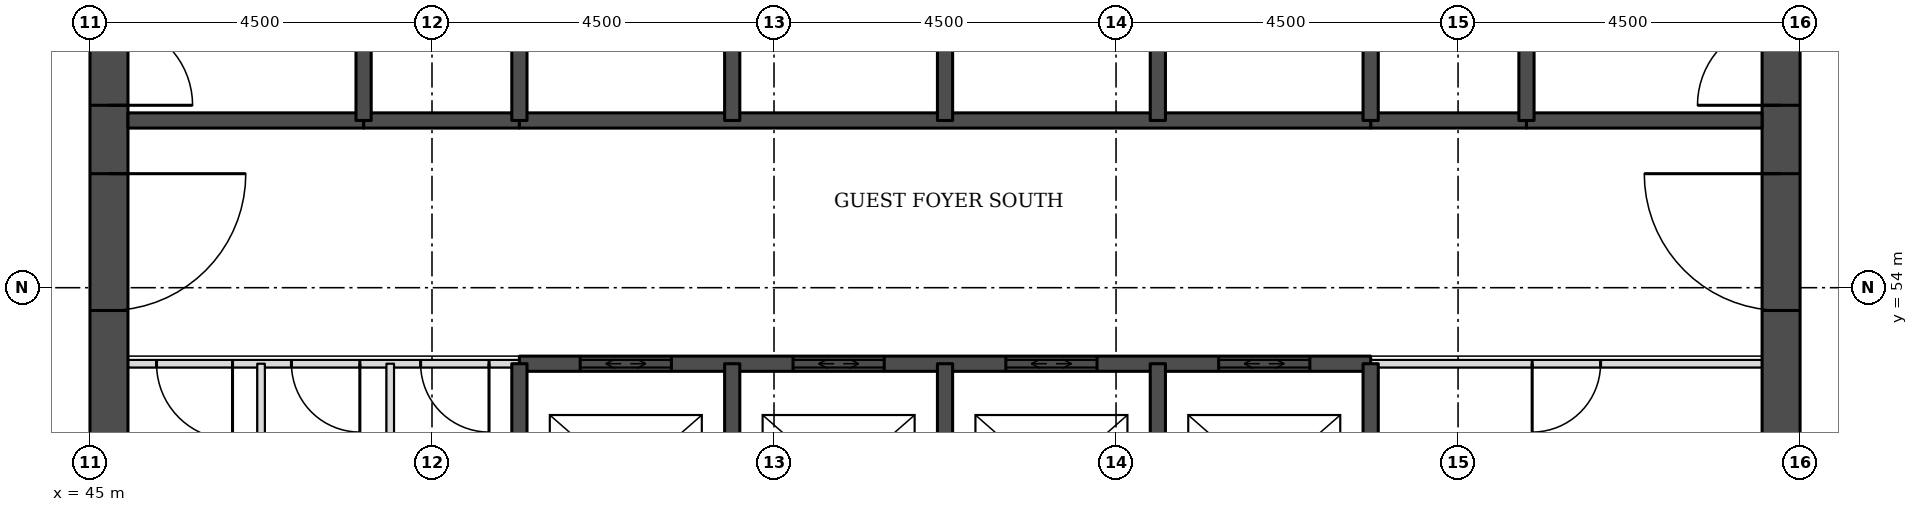
"""IFC4 building model, lengths in metres.
Left out: names, types, materials, properties, quantities, classifications, styles, units other than length and angle.
Written with IfcOpenShell. Run it as: python <this file> out.ifc"""

import sys

from ifc_helpers import new_model, si_unit, direction, frame, frame_2d, origin, place, context, subcontext, project, spatial, rectangle, extrude, element, fill, save


model = new_model("IFC4")
c1 = context("Model", 3, precision=1e-05, world=origin(), true_north=direction((0.0, 1.0)))
c2 = subcontext(c1, "Body", "Model", "MODEL_VIEW")
j1 = project(units=[si_unit("LENGTHUNIT", "METRE"), si_unit("PLANEANGLEUNIT", "RADIAN")], contexts=[c1])
p1 = place(None, origin())
s1 = spatial("IfcSite", under=j1, at=p1, CompositionType="ELEMENT")
p2 = place(p1, origin())
s2 = spatial("IfcBuilding", under=s1, at=p2, CompositionType="ELEMENT")
p3 = place(p2, frame((0.0, 0.0, 33.0)))
s3 = spatial("IfcBuildingStorey", under=s2, at=p3, CompositionType="ELEMENT", Elevation=33.0)
p4 = place(p3, frame((45.25, 49.5, 0.0), z_axis=(0.0, 0.0, 1.0), x_axis=(0.0, 1.0, 0.0)))
e1 = element("IfcWall", 1, at=p4, inside=s3, PredefinedType="SHEAR", context=c2, shape_type="SweptSolid", body=[
    extrude(rectangle(XDim=22.5, YDim=0.5, at=frame_2d((11.25, 0.0))), origin(), (0.0, 0.0, 1.0), 3.3),
])
p5 = place(p4, frame((4.2, 0.0, 0.0)))
e2 = element("IfcOpeningElement", 2, at=p5, cuts=e1, PredefinedType="OPENING", context=c2, shape_type="SweptSolid", body=[
    extrude(rectangle(XDim=1.8, YDim=2.1, at=frame_2d((0.9, 1.05))), frame((0.0, 0.26, 0.0), z_axis=(0.0, -1.0, 0.0), x_axis=(1.0, 0.0, 0.0)), (0.0, 0.0, 1.0), 0.52),
])
p6 = place(p4, frame((6.9, 0.0, 0.0)))
e3 = element("IfcOpeningElement", 3, at=p6, cuts=e1, PredefinedType="OPENING", context=c2, shape_type="SweptSolid", body=[
    extrude(rectangle(XDim=1.1, YDim=2.1, at=frame_2d((0.55, 1.05))), frame((0.0, 0.26, 0.0), z_axis=(0.0, -1.0, 0.0), x_axis=(1.0, 0.0, 0.0)), (0.0, 0.0, 1.0), 0.52),
])
p7 = place(p4, frame((13.6, 0.0, 0.0)))
e4 = element("IfcOpeningElement", 4, at=p7, cuts=e1, PredefinedType="OPENING", context=c2, shape_type="SweptSolid", body=[
    extrude(rectangle(XDim=1.1, YDim=2.1, at=frame_2d((0.55, 1.05))), frame((0.0, 0.26, 0.0), z_axis=(0.0, -1.0, 0.0), x_axis=(1.0, 0.0, 0.0)), (0.0, 0.0, 1.0), 0.52),
])
p8 = place(p4, frame((16.5, 0.0, 0.0)))
e5 = element("IfcOpeningElement", 5, at=p8, cuts=e1, PredefinedType="OPENING", context=c2, shape_type="SweptSolid", body=[
    extrude(rectangle(XDim=1.8, YDim=2.1, at=frame_2d((0.9, 1.05))), frame((0.0, 0.26, 0.0), z_axis=(0.0, -1.0, 0.0), x_axis=(1.0, 0.0, 0.0)), (0.0, 0.0, 1.0), 0.52),
])
p9 = place(p3, frame((67.25, 49.5, 0.0), z_axis=(0.0, 0.0, 1.0), x_axis=(0.0, 1.0, 0.0)))
e6 = element("IfcWall", 6, at=p9, inside=s3, PredefinedType="SHEAR", context=c2, shape_type="SweptSolid", body=[
    extrude(rectangle(XDim=22.5, YDim=0.5, at=frame_2d((11.25, 0.0))), origin(), (0.0, 0.0, 1.0), 3.3),
])
p10 = place(p9, frame((4.2, 0.0, 0.0)))
e7 = element("IfcOpeningElement", 7, at=p10, cuts=e6, PredefinedType="OPENING", context=c2, shape_type="SweptSolid", body=[
    extrude(rectangle(XDim=1.8, YDim=2.1, at=frame_2d((0.9, 1.05))), frame((0.0, 0.26, 0.0), z_axis=(0.0, -1.0, 0.0), x_axis=(1.0, 0.0, 0.0)), (0.0, 0.0, 1.0), 0.52),
])
p11 = place(p9, frame((6.9, 0.0, 0.0)))
e8 = element("IfcOpeningElement", 8, at=p11, cuts=e6, PredefinedType="OPENING", context=c2, shape_type="SweptSolid", body=[
    extrude(rectangle(XDim=1.1, YDim=2.1, at=frame_2d((0.55, 1.05))), frame((0.0, 0.26, 0.0), z_axis=(0.0, -1.0, 0.0), x_axis=(1.0, 0.0, 0.0)), (0.0, 0.0, 1.0), 0.52),
])
p12 = place(p9, frame((13.6, 0.0, 0.0)))
e9 = element("IfcOpeningElement", 9, at=p12, cuts=e6, PredefinedType="OPENING", context=c2, shape_type="SweptSolid", body=[
    extrude(rectangle(XDim=1.1, YDim=2.1, at=frame_2d((0.55, 1.05))), frame((0.0, 0.26, 0.0), z_axis=(0.0, -1.0, 0.0), x_axis=(1.0, 0.0, 0.0)), (0.0, 0.0, 1.0), 0.52),
])
p13 = place(p9, frame((16.5, 0.0, 0.0)))
e10 = element("IfcOpeningElement", 10, at=p13, cuts=e6, PredefinedType="OPENING", context=c2, shape_type="SweptSolid", body=[
    extrude(rectangle(XDim=1.8, YDim=2.1, at=frame_2d((0.9, 1.05))), frame((0.0, 0.26, 0.0), z_axis=(0.0, -1.0, 0.0), x_axis=(1.0, 0.0, 0.0)), (0.0, 0.0, 1.0), 0.52),
])
p14 = place(p3, frame((45.5, 53.0, 0.0), z_axis=(0.0, 0.0, 1.0), x_axis=(1.0, 0.0, 0.0)))
e11 = element("IfcWall", 11, at=p14, inside=s3, PredefinedType="PARTITIONING", context=c2, shape_type="SweptSolid", body=[
    extrude(rectangle(XDim=5.15, YDim=0.1, at=frame_2d((2.575, 0.0))), origin(), (0.0, 0.0, 1.0), 3.08),
])
p15 = place(p14, frame((0.375, 0.0, 0.0)))
e12 = element("IfcOpeningElement", 12, at=p15, cuts=e11, PredefinedType="OPENING", context=c2, shape_type="SweptSolid", body=[
    extrude(rectangle(XDim=1.0, YDim=2.1, at=frame_2d((0.5, 1.05))), frame((0.0, 0.06, 0.0), z_axis=(0.0, -1.0, 0.0), x_axis=(1.0, 0.0, 0.0)), (0.0, 0.0, 1.0), 0.12),
])
p16 = place(p14, frame((2.151, 0.0, 0.0)))
e13 = element("IfcOpeningElement", 13, at=p16, cuts=e11, PredefinedType="OPENING", context=c2, shape_type="SweptSolid", body=[
    extrude(rectangle(XDim=0.9, YDim=2.1, at=frame_2d((0.45, 1.05))), frame((0.0, 0.06, 0.0), z_axis=(0.0, -1.0, 0.0), x_axis=(1.0, 0.0, 0.0)), (0.0, 0.0, 1.0), 0.12),
])
p17 = place(p14, frame((3.85, 0.0, 0.0)))
e14 = element("IfcOpeningElement", 14, at=p17, cuts=e11, PredefinedType="OPENING", context=c2, shape_type="SweptSolid", body=[
    extrude(rectangle(XDim=0.9, YDim=2.1, at=frame_2d((0.45, 1.05))), frame((0.0, 0.06, 0.0), z_axis=(0.0, -1.0, 0.0), x_axis=(1.0, 0.0, 0.0)), (0.0, 0.0, 1.0), 0.12),
])
p18 = place(p3, frame((61.85, 53.0, 0.0), z_axis=(0.0, 0.0, 1.0), x_axis=(1.0, 0.0, 0.0)))
e15 = element("IfcWall", 15, at=p18, inside=s3, PredefinedType="PARTITIONING", context=c2, shape_type="SweptSolid", body=[
    extrude(rectangle(XDim=5.15, YDim=0.1, at=frame_2d((2.575, 0.0))), origin(), (0.0, 0.0, 1.0), 3.08),
])
p19 = place(p18, frame((2.125, 0.0, 0.0)))
e16 = element("IfcOpeningElement", 16, at=p19, cuts=e15, PredefinedType="OPENING", context=c2, shape_type="SweptSolid", body=[
    extrude(rectangle(XDim=0.9, YDim=2.1, at=frame_2d((0.45, 1.05))), frame((0.0, 0.06, 0.0), z_axis=(0.0, -1.0, 0.0), x_axis=(1.0, 0.0, 0.0)), (0.0, 0.0, 1.0), 0.12),
])
p20 = place(p3, frame((50.65, 53.0, 0.0), z_axis=(0.0, 0.0, 1.0), x_axis=(1.0, 0.0, 0.0)))
e17 = element("IfcWall", 17, at=p20, inside=s3, PredefinedType="SOLIDWALL", context=c2, shape_type="SweptSolid", body=[
    extrude(rectangle(XDim=11.2, YDim=0.2, at=frame_2d((5.6, 0.0))), origin(), (0.0, 0.0, 1.0), 3.08),
])
p21 = place(p20, frame((0.8, 0.0, 0.0)))
e18 = element("IfcOpeningElement", 18, at=p21, cuts=e17, PredefinedType="OPENING", context=c2, shape_type="SweptSolid", body=[
    extrude(rectangle(XDim=1.2, YDim=2.1, at=frame_2d((0.6, 1.05))), frame((0.0, 0.11, 0.0), z_axis=(0.0, -1.0, 0.0), x_axis=(1.0, 0.0, 0.0)), (0.0, 0.0, 1.0), 0.22),
])
p22 = place(p20, frame((3.6, 0.0, 0.0)))
e19 = element("IfcOpeningElement", 19, at=p22, cuts=e17, PredefinedType="OPENING", context=c2, shape_type="SweptSolid", body=[
    extrude(rectangle(XDim=1.2, YDim=2.1, at=frame_2d((0.6, 1.05))), frame((0.0, 0.11, 0.0), z_axis=(0.0, -1.0, 0.0), x_axis=(1.0, 0.0, 0.0)), (0.0, 0.0, 1.0), 0.22),
])
p23 = place(p20, frame((6.4, 0.0, 0.0)))
e20 = element("IfcOpeningElement", 20, at=p23, cuts=e17, PredefinedType="OPENING", context=c2, shape_type="SweptSolid", body=[
    extrude(rectangle(XDim=1.2, YDim=2.1, at=frame_2d((0.6, 1.05))), frame((0.0, 0.11, 0.0), z_axis=(0.0, -1.0, 0.0), x_axis=(1.0, 0.0, 0.0)), (0.0, 0.0, 1.0), 0.22),
])
p24 = place(p20, frame((9.2, 0.0, 0.0)))
e21 = element("IfcOpeningElement", 21, at=p24, cuts=e17, PredefinedType="OPENING", context=c2, shape_type="SweptSolid", body=[
    extrude(rectangle(XDim=1.2, YDim=2.1, at=frame_2d((0.6, 1.05))), frame((0.0, 0.11, 0.0), z_axis=(0.0, -1.0, 0.0), x_axis=(1.0, 0.0, 0.0)), (0.0, 0.0, 1.0), 0.22),
])
for number, where, z_axis, x_axis in (
    (22, (48.6, 56.2, 0.0), (0.0, 0.0, 1.0), (1.0, 0.0, 0.0)),
    (23, (61.85, 56.2, 0.0), (0.0, 0.0, 1.0), (1.0, 0.0, 0.0)),
):
    element("IfcWall", number, at=place(p3, frame(where, z_axis=z_axis, x_axis=x_axis)), inside=s3, PredefinedType="SOLIDWALL", context=c2, shape_type="SweptSolid", body=[
        extrude(rectangle(XDim=2.05, YDim=0.2, at=frame_2d((1.025, 0.0))), origin(), (0.0, 0.0, 1.0), 3.08),
    ])
p25 = place(p3, frame((45.5, 56.2, 0.0), z_axis=(0.0, 0.0, 1.0), x_axis=(1.0, 0.0, 0.0)))
e24 = element("IfcWall", 24, at=p25, inside=s3, PredefinedType="SOLIDWALL", context=c2, shape_type="SweptSolid", body=[
    extrude(rectangle(XDim=3.1, YDim=0.2, at=frame_2d((1.55, 0.0))), origin(), (0.0, 0.0, 1.0), 3.08),
])
p26 = place(p3, frame((50.65, 56.2, 0.0), z_axis=(0.0, 0.0, 1.0), x_axis=(1.0, 0.0, 0.0)))
e25 = element("IfcWall", 25, at=p26, inside=s3, PredefinedType="SOLIDWALL", context=c2, shape_type="SweptSolid", body=[
    extrude(rectangle(XDim=11.2, YDim=0.2, at=frame_2d((5.6, 0.0))), origin(), (0.0, 0.0, 1.0), 3.08),
])
p27 = place(p3, frame((63.9, 56.2, 0.0), z_axis=(0.0, 0.0, 1.0), x_axis=(1.0, 0.0, 0.0)))
e26 = element("IfcWall", 26, at=p27, inside=s3, PredefinedType="SOLIDWALL", context=c2, shape_type="SweptSolid", body=[
    extrude(rectangle(XDim=3.1, YDim=0.2, at=frame_2d((1.55, 0.0))), origin(), (0.0, 0.0, 1.0), 3.08),
])
p28 = place(p3, frame((47.251, 50.0, 0.0), z_axis=(0.0, 0.0, 1.0), x_axis=(0.0, 1.0, 0.0)))
e27 = element("IfcWall", 27, at=p28, inside=s3, PredefinedType="PARTITIONING", context=c2, shape_type="SweptSolid", body=[
    extrude(rectangle(XDim=3.0, YDim=0.1, at=frame_2d((1.5, 0.0))), origin(), (0.0, 0.0, 1.0), 3.08),
])
p29 = place(p3, frame((48.6, 56.2, 0.0), z_axis=(0.0, 0.0, 1.0), x_axis=(0.0, 1.0, 0.0)))
e28 = element("IfcWall", 28, at=p29, inside=s3, PredefinedType="SOLIDWALL", context=c2, shape_type="SweptSolid", body=[
    extrude(rectangle(XDim=5.8, YDim=0.2, at=frame_2d((2.9, 0.0))), origin(), (0.0, 0.0, 1.0), 3.08),
])
p30 = place(p3, frame((48.95, 50.0, 0.0), z_axis=(0.0, 0.0, 1.0), x_axis=(0.0, 1.0, 0.0)))
e29 = element("IfcWall", 29, at=p30, inside=s3, PredefinedType="PARTITIONING", context=c2, shape_type="SweptSolid", body=[
    extrude(rectangle(XDim=3.0, YDim=0.1, at=frame_2d((1.5, 0.0))), origin(), (0.0, 0.0, 1.0), 3.08),
])
p31 = place(p3, frame((50.65, 50.0, 0.0), z_axis=(0.0, 0.0, 1.0), x_axis=(0.0, 1.0, 0.0)))
e30 = element("IfcWall", 30, at=p31, inside=s3, PredefinedType="SOLIDWALL", context=c2, shape_type="SweptSolid", body=[
    extrude(rectangle(XDim=3.0, YDim=0.2, at=frame_2d((1.5, 0.0))), origin(), (0.0, 0.0, 1.0), 3.08),
])
p32 = place(p3, frame((50.65, 56.2, 0.0), z_axis=(0.0, 0.0, 1.0), x_axis=(0.0, 1.0, 0.0)))
e31 = element("IfcWall", 31, at=p32, inside=s3, PredefinedType="SOLIDWALL", context=c2, shape_type="SweptSolid", body=[
    extrude(rectangle(XDim=2.8, YDim=0.2, at=frame_2d((1.4, 0.0))), origin(), (0.0, 0.0, 1.0), 3.08),
])
p33 = place(p3, frame((53.45, 50.0, 0.0), z_axis=(0.0, 0.0, 1.0), x_axis=(0.0, 1.0, 0.0)))
e32 = element("IfcWall", 32, at=p33, inside=s3, PredefinedType="SOLIDWALL", context=c2, shape_type="SweptSolid", body=[
    extrude(rectangle(XDim=3.0, YDim=0.2, at=frame_2d((1.5, 0.0))), origin(), (0.0, 0.0, 1.0), 3.08),
])
p34 = place(p3, frame((53.45, 56.2, 0.0), z_axis=(0.0, 0.0, 1.0), x_axis=(0.0, 1.0, 0.0)))
e33 = element("IfcWall", 33, at=p34, inside=s3, PredefinedType="SOLIDWALL", context=c2, shape_type="SweptSolid", body=[
    extrude(rectangle(XDim=2.8, YDim=0.2, at=frame_2d((1.4, 0.0))), origin(), (0.0, 0.0, 1.0), 3.08),
])
p35 = place(p3, frame((56.25, 50.0, 0.0), z_axis=(0.0, 0.0, 1.0), x_axis=(0.0, 1.0, 0.0)))
e34 = element("IfcWall", 34, at=p35, inside=s3, PredefinedType="SOLIDWALL", context=c2, shape_type="SweptSolid", body=[
    extrude(rectangle(XDim=3.0, YDim=0.2, at=frame_2d((1.5, 0.0))), origin(), (0.0, 0.0, 1.0), 3.08),
])
p36 = place(p3, frame((56.25, 56.2, 0.0), z_axis=(0.0, 0.0, 1.0), x_axis=(0.0, 1.0, 0.0)))
e35 = element("IfcWall", 35, at=p36, inside=s3, PredefinedType="SOLIDWALL", context=c2, shape_type="SweptSolid", body=[
    extrude(rectangle(XDim=2.8, YDim=0.2, at=frame_2d((1.4, 0.0))), origin(), (0.0, 0.0, 1.0), 3.08),
])
p37 = place(p3, frame((59.05, 50.0, 0.0), z_axis=(0.0, 0.0, 1.0), x_axis=(0.0, 1.0, 0.0)))
e36 = element("IfcWall", 36, at=p37, inside=s3, PredefinedType="SOLIDWALL", context=c2, shape_type="SweptSolid", body=[
    extrude(rectangle(XDim=3.0, YDim=0.2, at=frame_2d((1.5, 0.0))), origin(), (0.0, 0.0, 1.0), 3.08),
])
p38 = place(p3, frame((59.05, 56.2, 0.0), z_axis=(0.0, 0.0, 1.0), x_axis=(0.0, 1.0, 0.0)))
e37 = element("IfcWall", 37, at=p38, inside=s3, PredefinedType="SOLIDWALL", context=c2, shape_type="SweptSolid", body=[
    extrude(rectangle(XDim=2.8, YDim=0.2, at=frame_2d((1.4, 0.0))), origin(), (0.0, 0.0, 1.0), 3.08),
])
p39 = place(p3, frame((61.85, 50.0, 0.0), z_axis=(0.0, 0.0, 1.0), x_axis=(0.0, 1.0, 0.0)))
e38 = element("IfcWall", 38, at=p39, inside=s3, PredefinedType="SOLIDWALL", context=c2, shape_type="SweptSolid", body=[
    extrude(rectangle(XDim=3.0, YDim=0.2, at=frame_2d((1.5, 0.0))), origin(), (0.0, 0.0, 1.0), 3.08),
])
p40 = place(p3, frame((61.85, 56.2, 0.0), z_axis=(0.0, 0.0, 1.0), x_axis=(0.0, 1.0, 0.0)))
e39 = element("IfcWall", 39, at=p40, inside=s3, PredefinedType="SOLIDWALL", context=c2, shape_type="SweptSolid", body=[
    extrude(rectangle(XDim=2.8, YDim=0.2, at=frame_2d((1.4, 0.0))), origin(), (0.0, 0.0, 1.0), 3.08),
])
p41 = place(p3, frame((63.9, 56.2, 0.0), z_axis=(0.0, 0.0, 1.0), x_axis=(0.0, 1.0, 0.0)))
e40 = element("IfcWall", 40, at=p41, inside=s3, PredefinedType="SOLIDWALL", context=c2, shape_type="SweptSolid", body=[
    extrude(rectangle(XDim=5.8, YDim=0.2, at=frame_2d((2.9, 0.0))), origin(), (0.0, 0.0, 1.0), 3.08),
])
p42 = place(p21, origin())
e41 = element("IfcDoor", 41, at=p42, inside=s3, OperationType="DOUBLE_DOOR_SLIDING", PredefinedType="DOOR", context=c2, shape_type="SweptSolid", body=[
    extrude(rectangle(XDim=1.2, YDim=2.1, at=frame_2d((0.6, 1.05))), frame((0.0, 0.025, 0.0), z_axis=(0.0, -1.0, 0.0), x_axis=(1.0, 0.0, 0.0)), (0.0, 0.0, 1.0), 0.05),
])
fill(e18, e41)
p43 = place(p22, origin())
e42 = element("IfcDoor", 42, at=p43, inside=s3, OperationType="DOUBLE_DOOR_SLIDING", PredefinedType="DOOR", context=c2, shape_type="SweptSolid", body=[
    extrude(rectangle(XDim=1.2, YDim=2.1, at=frame_2d((0.6, 1.05))), frame((0.0, 0.025, 0.0), z_axis=(0.0, -1.0, 0.0), x_axis=(1.0, 0.0, 0.0)), (0.0, 0.0, 1.0), 0.05),
])
fill(e19, e42)
p44 = place(p23, origin())
e43 = element("IfcDoor", 43, at=p44, inside=s3, OperationType="DOUBLE_DOOR_SLIDING", PredefinedType="DOOR", context=c2, shape_type="SweptSolid", body=[
    extrude(rectangle(XDim=1.2, YDim=2.1, at=frame_2d((0.6, 1.05))), frame((0.0, 0.025, 0.0), z_axis=(0.0, -1.0, 0.0), x_axis=(1.0, 0.0, 0.0)), (0.0, 0.0, 1.0), 0.05),
])
fill(e20, e43)
p45 = place(p24, origin())
e44 = element("IfcDoor", 44, at=p45, inside=s3, OperationType="DOUBLE_DOOR_SLIDING", PredefinedType="DOOR", context=c2, shape_type="SweptSolid", body=[
    extrude(rectangle(XDim=1.2, YDim=2.1, at=frame_2d((0.6, 1.05))), frame((0.0, 0.025, 0.0), z_axis=(0.0, -1.0, 0.0), x_axis=(1.0, 0.0, 0.0)), (0.0, 0.0, 1.0), 0.05),
])
fill(e21, e44)
p46 = place(p5, frame((1.8, 0.0, 0.0), z_axis=(0.0, 0.0, 1.0), x_axis=(-1.0, 0.0, 0.0)))
e45 = element("IfcDoor", 45, at=p46, inside=s3, OperationType="SINGLE_SWING_LEFT", PredefinedType="DOOR", context=c2, shape_type="SweptSolid", body=[
    extrude(rectangle(XDim=1.8, YDim=2.1, at=frame_2d((0.9, 1.05))), frame((0.0, 0.025, 0.0), z_axis=(0.0, -1.0, 0.0), x_axis=(1.0, 0.0, 0.0)), (0.0, 0.0, 1.0), 0.05),
])
fill(e2, e45)
p47 = place(p6, frame((1.1, 0.0, 0.0), z_axis=(0.0, 0.0, 1.0), x_axis=(-1.0, 0.0, 0.0)))
e46 = element("IfcDoor", 46, at=p47, inside=s3, OperationType="SINGLE_SWING_RIGHT", PredefinedType="DOOR", context=c2, shape_type="SweptSolid", body=[
    extrude(rectangle(XDim=1.1, YDim=2.1, at=frame_2d((0.55, 1.05))), frame((0.0, 0.025, 0.0), z_axis=(0.0, -1.0, 0.0), x_axis=(1.0, 0.0, 0.0)), (0.0, 0.0, 1.0), 0.05),
])
fill(e3, e46)
p48 = place(p10, origin())
e47 = element("IfcDoor", 47, at=p48, inside=s3, OperationType="SINGLE_SWING_RIGHT", PredefinedType="DOOR", context=c2, shape_type="SweptSolid", body=[
    extrude(rectangle(XDim=1.8, YDim=2.1, at=frame_2d((0.9, 1.05))), frame((0.0, 0.025, 0.0), z_axis=(0.0, -1.0, 0.0), x_axis=(1.0, 0.0, 0.0)), (0.0, 0.0, 1.0), 0.05),
])
fill(e7, e47)
p49 = place(p11, origin())
e48 = element("IfcDoor", 48, at=p49, inside=s3, OperationType="SINGLE_SWING_LEFT", PredefinedType="DOOR", context=c2, shape_type="SweptSolid", body=[
    extrude(rectangle(XDim=1.1, YDim=2.1, at=frame_2d((0.55, 1.05))), frame((0.0, 0.025, 0.0), z_axis=(0.0, -1.0, 0.0), x_axis=(1.0, 0.0, 0.0)), (0.0, 0.0, 1.0), 0.05),
])
fill(e8, e48)
p50 = place(p19, frame((0.9, 0.0, 0.0), z_axis=(0.0, 0.0, 1.0), x_axis=(-1.0, 0.0, 0.0)))
e49 = element("IfcDoor", 49, at=p50, inside=s3, OperationType="SINGLE_SWING_RIGHT", PredefinedType="DOOR", context=c2, shape_type="SweptSolid", body=[
    extrude(rectangle(XDim=0.9, YDim=2.1, at=frame_2d((0.45, 1.05))), frame((0.0, 0.025, 0.0), z_axis=(0.0, -1.0, 0.0), x_axis=(1.0, 0.0, 0.0)), (0.0, 0.0, 1.0), 0.05),
])
fill(e16, e49)
p51 = place(p15, frame((1.0, 0.0, 0.0), z_axis=(0.0, 0.0, 1.0), x_axis=(-1.0, 0.0, 0.0)))
e50 = element("IfcDoor", 50, at=p51, inside=s3, OperationType="SINGLE_SWING_LEFT", PredefinedType="DOOR", context=c2, shape_type="SweptSolid", body=[
    extrude(rectangle(XDim=1.0, YDim=2.1, at=frame_2d((0.5, 1.05))), frame((0.0, 0.025, 0.0), z_axis=(0.0, -1.0, 0.0), x_axis=(1.0, 0.0, 0.0)), (0.0, 0.0, 1.0), 0.05),
])
fill(e12, e50)
p52 = place(p16, frame((0.9, 0.0, 0.0), z_axis=(0.0, 0.0, 1.0), x_axis=(-1.0, 0.0, 0.0)))
e51 = element("IfcDoor", 51, at=p52, inside=s3, OperationType="SINGLE_SWING_LEFT", PredefinedType="DOOR", context=c2, shape_type="SweptSolid", body=[
    extrude(rectangle(XDim=0.9, YDim=2.1, at=frame_2d((0.45, 1.05))), frame((0.0, 0.025, 0.0), z_axis=(0.0, -1.0, 0.0), x_axis=(1.0, 0.0, 0.0)), (0.0, 0.0, 1.0), 0.05),
])
fill(e13, e51)
p53 = place(p17, frame((0.9, 0.0, 0.0), z_axis=(0.0, 0.0, 1.0), x_axis=(-1.0, 0.0, 0.0)))
e52 = element("IfcDoor", 52, at=p53, inside=s3, OperationType="SINGLE_SWING_LEFT", PredefinedType="DOOR", context=c2, shape_type="SweptSolid", body=[
    extrude(rectangle(XDim=0.9, YDim=2.1, at=frame_2d((0.45, 1.05))), frame((0.0, 0.025, 0.0), z_axis=(0.0, -1.0, 0.0), x_axis=(1.0, 0.0, 0.0)), (0.0, 0.0, 1.0), 0.05),
])
fill(e14, e52)
save(model, sys.argv[1])
